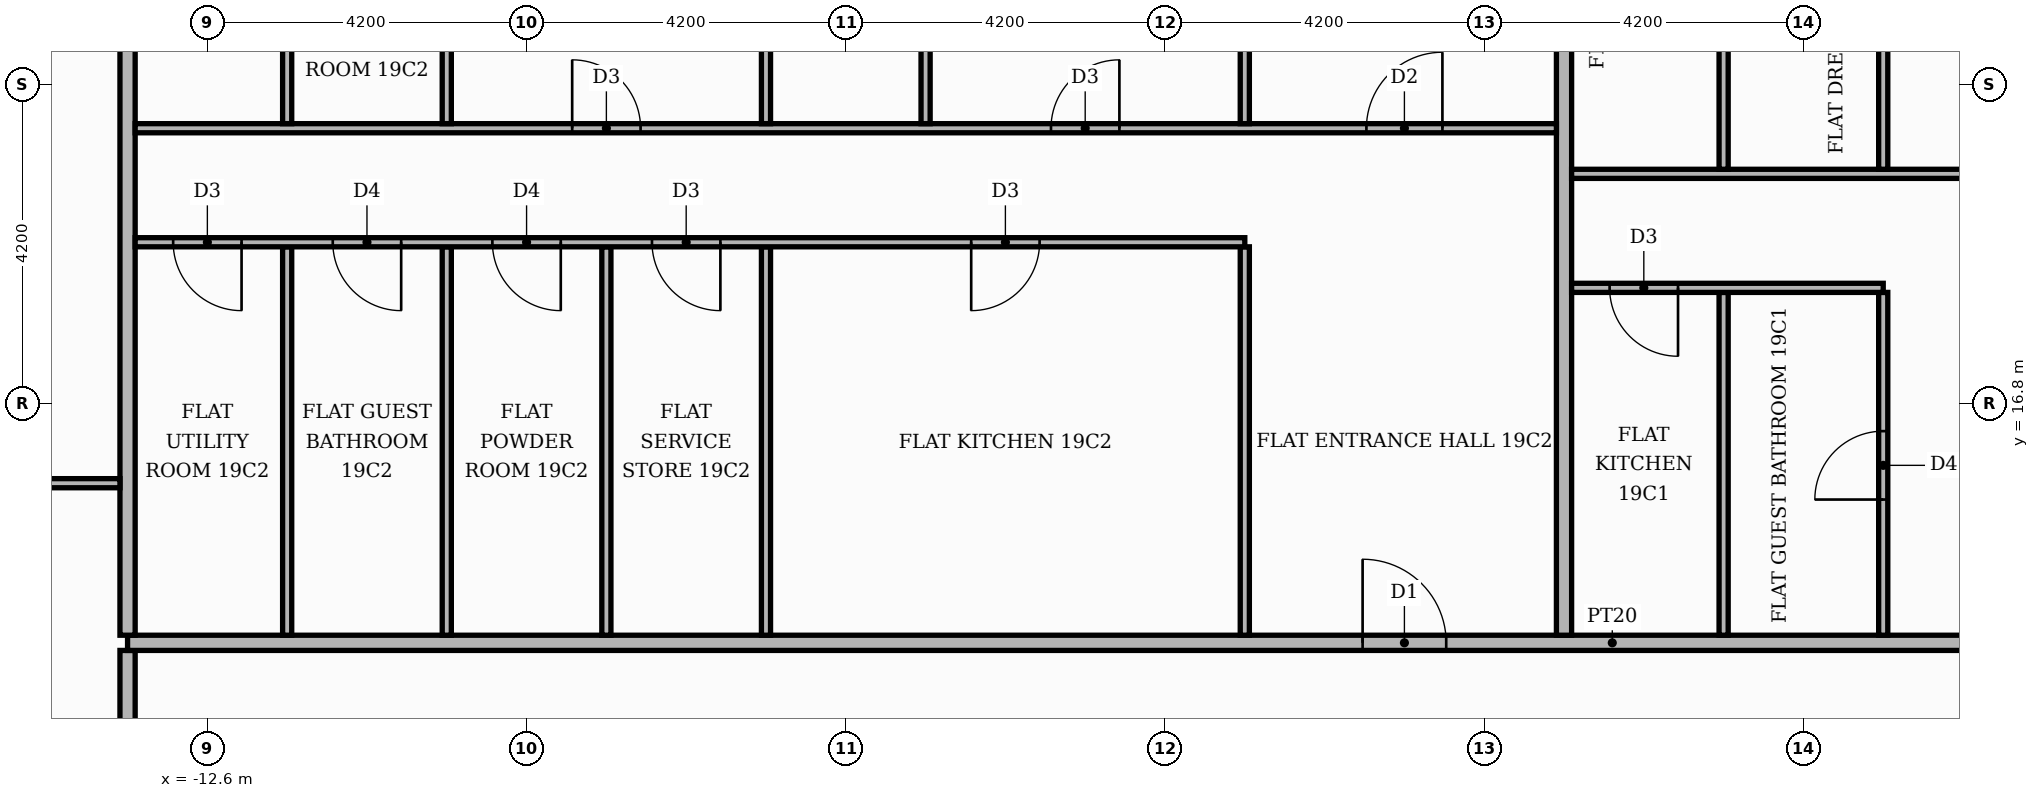
"""IFC4 building model, lengths in metres.
Left out: names, types, materials, properties, quantities, classifications, styles, units other than length and angle.
Written with IfcOpenShell. Run it as: python <this file> out.ifc"""

import sys

from ifc_helpers import new_model, si_unit, direction, frame, frame_2d, origin, place, context, subcontext, project, spatial, rectangle, extrude, element, fill, save


model = new_model("IFC4")
c1 = context("Model", 3, precision=1e-05, world=origin(), true_north=direction((0.0, 1.0)))
c2 = subcontext(c1, "Body", "Model", "MODEL_VIEW")
j1 = project(units=[si_unit("LENGTHUNIT", "METRE"), si_unit("PLANEANGLEUNIT", "RADIAN")], contexts=[c1])
p1 = place(None, origin())
s1 = spatial("IfcSite", under=j1, at=p1, CompositionType="ELEMENT")
p2 = place(p1, origin())
s2 = spatial("IfcBuilding", under=s1, at=p2, CompositionType="ELEMENT")
p3 = place(p2, frame((0.0, 0.0, 83.1)))
s3 = spatial("IfcBuildingStorey", under=s2, at=p3, CompositionType="ELEMENT", Elevation=83.1)
p4 = place(p3, frame((-13.65, 5.35, 0.0), z_axis=(0.0, 0.0, 1.0), x_axis=(0.0, 1.0, 0.0)))
e1 = element("IfcWall", 1, at=p4, inside=s3, PredefinedType="PARTITIONING", context=c2, shape_type="SweptSolid", body=[
    extrude(rectangle(XDim=8.2, YDim=0.2, at=frame_2d((4.1, 0.0))), origin(), (0.0, 0.0, 1.0), 3.48),
])
p5 = place(p4, frame((5.65, 0.0, 0.0)))
e2 = element("IfcOpeningElement", 2, at=p5, cuts=e1, PredefinedType="OPENING", context=c2, shape_type="SweptSolid", body=[
    extrude(rectangle(XDim=1.1, YDim=2.4, at=frame_2d((0.55, 1.2))), frame((0.0, 0.11, 0.0), z_axis=(0.0, -1.0, 0.0), x_axis=(1.0, 0.0, 0.0)), (0.0, 0.0, 1.0), 0.22),
])
p6 = place(p3, frame((-13.65, 13.65, 0.0), z_axis=(0.0, 0.0, 1.0), x_axis=(1.0, 0.0, 0.0)))
e3 = element("IfcWall", 3, at=p6, inside=s3, PredefinedType="PARTITIONING", context=c2, shape_type="SweptSolid", body=[
    extrude(rectangle(XDim=39.07, YDim=0.2, at=frame_2d((19.535, 0.0))), origin(), (0.0, 0.0, 1.0), 3.48),
])
p7 = place(p6, frame((24.65, 0.0, 0.0)))
e4 = element("IfcOpeningElement", 4, at=p7, cuts=e3, PredefinedType="OPENING", context=c2, shape_type="SweptSolid", body=[
    extrude(rectangle(XDim=1.1, YDim=2.4, at=frame_2d((0.55, 1.2))), frame((0.0, 0.11, 0.0), z_axis=(0.0, -1.0, 0.0), x_axis=(1.0, 0.0, 0.0)), (0.0, 0.0, 1.0), 0.22),
])
p8 = place(p6, frame((16.25, 0.0, 0.0)))
e5 = element("IfcOpeningElement", 5, at=p8, cuts=e3, PredefinedType="OPENING", context=c2, shape_type="SweptSolid", body=[
    extrude(rectangle(XDim=1.1, YDim=2.4, at=frame_2d((0.55, 1.2))), frame((0.0, 0.11, 0.0), z_axis=(0.0, -1.0, 0.0), x_axis=(1.0, 0.0, 0.0)), (0.0, 0.0, 1.0), 0.22),
])
p9 = place(p3, frame((-13.65, 13.75, 0.0), z_axis=(0.0, 0.0, 1.0), x_axis=(0.0, 1.0, 0.0)))
e6 = element("IfcWall", 6, at=p9, inside=s3, PredefinedType="PARTITIONING", context=c2, shape_type="SweptSolid", body=[
    extrude(rectangle(XDim=11.67, YDim=0.2, at=frame_2d((5.835, 0.0))), origin(), (0.0, 0.0, 1.0), 3.48),
])
for number, where, z_axis, x_axis in (
    (7, (-11.55, 13.75, 0.0), (0.0, 0.0, 1.0), (0.0, 1.0, 0.0)),
    (8, (-9.45, 13.75, 0.0), (0.0, 0.0, 1.0), (0.0, 1.0, 0.0)),
    (9, (-7.35, 13.75, 0.0), (0.0, 0.0, 1.0), (0.0, 1.0, 0.0)),
    (10, (-5.25, 13.75, 0.0), (0.0, 0.0, 1.0), (0.0, 1.0, 0.0)),
    (11, (1.05, 13.75, 0.0), (0.0, 0.0, 1.0), (0.0, 1.0, 0.0)),
):
    element("IfcWall", number, at=place(p3, frame(where, z_axis=z_axis, x_axis=x_axis)), inside=s3, PredefinedType="PARTITIONING", context=c2, shape_type="SweptSolid", body=[
        extrude(rectangle(XDim=5.11, YDim=0.12, at=frame_2d((2.555, 0.0))), origin(), (0.0, 0.0, 1.0), 3.48),
    ])
p10 = place(p3, frame((5.25, 13.75, 0.0), z_axis=(0.0, 0.0, 1.0), x_axis=(0.0, 1.0, 0.0)))
e12 = element("IfcWall", 12, at=p10, inside=s3, PredefinedType="PARTITIONING", context=c2, shape_type="SweptSolid", body=[
    extrude(rectangle(XDim=11.67, YDim=0.2, at=frame_2d((5.835, 0.0))), origin(), (0.0, 0.0, 1.0), 3.48),
])
p11 = place(p3, frame((7.35, 13.75, 0.0), z_axis=(0.0, 0.0, 1.0), x_axis=(0.0, 1.0, 0.0)))
e13 = element("IfcWall", 13, at=p11, inside=s3, PredefinedType="PARTITIONING", context=c2, shape_type="SweptSolid", body=[
    extrude(rectangle(XDim=4.51, YDim=0.12, at=frame_2d((2.255, 0.0))), origin(), (0.0, 0.0, 1.0), 3.48),
])
p12 = place(p3, frame((9.45, 13.75, 0.0), z_axis=(0.0, 0.0, 1.0), x_axis=(0.0, 1.0, 0.0)))
e14 = element("IfcWall", 14, at=p12, inside=s3, PredefinedType="PARTITIONING", context=c2, shape_type="SweptSolid", body=[
    extrude(rectangle(XDim=4.51, YDim=0.12, at=frame_2d((2.255, 0.0))), origin(), (0.0, 0.0, 1.0), 3.48),
])
p13 = place(p12, frame((1.785, 0.0, 0.0)))
e15 = element("IfcOpeningElement", 15, at=p13, cuts=e14, PredefinedType="OPENING", context=c2, shape_type="SweptSolid", body=[
    extrude(rectangle(XDim=0.9, YDim=2.1, at=frame_2d((0.45, 1.05))), frame((0.0, 0.07, 0.0), z_axis=(0.0, -1.0, 0.0), x_axis=(1.0, 0.0, 0.0)), (0.0, 0.0, 1.0), 0.14),
])
p14 = place(p3, frame((-19.82, 15.75, 0.0), z_axis=(0.0, 0.0, 1.0), x_axis=(1.0, 0.0, 0.0)))
e16 = element("IfcWall", 16, at=p14, inside=s3, PredefinedType="PARTITIONING", context=c2, shape_type="SweptSolid", body=[
    extrude(rectangle(XDim=6.07, YDim=0.12, at=frame_2d((3.035, 0.0))), origin(), (0.0, 0.0, 1.0), 3.48),
])
p15 = place(p14, frame((2.585, 0.0, 0.0)))
e17 = element("IfcOpeningElement", 17, at=p15, cuts=e16, PredefinedType="OPENING", context=c2, shape_type="SweptSolid", body=[
    extrude(rectangle(XDim=1.0, YDim=2.1, at=frame_2d((0.5, 1.05))), frame((0.0, 0.07, 0.0), z_axis=(0.0, -1.0, 0.0), x_axis=(1.0, 0.0, 0.0)), (0.0, 0.0, 1.0), 0.14),
])
p16 = place(p3, frame((5.35, 18.32, 0.0), z_axis=(0.0, 0.0, 1.0), x_axis=(1.0, 0.0, 0.0)))
e18 = element("IfcWall", 18, at=p16, inside=s3, PredefinedType="PARTITIONING", context=c2, shape_type="SweptSolid", body=[
    extrude(rectangle(XDim=4.1, YDim=0.12, at=frame_2d((2.05, 0.0))), origin(), (0.0, 0.0, 1.0), 3.48),
])
p17 = place(p16, frame((0.5, 0.0, 0.0)))
e19 = element("IfcOpeningElement", 19, at=p17, cuts=e18, PredefinedType="OPENING", context=c2, shape_type="SweptSolid", body=[
    extrude(rectangle(XDim=0.9, YDim=2.1, at=frame_2d((0.45, 1.05))), frame((0.0, 0.07, 0.0), z_axis=(0.0, -1.0, 0.0), x_axis=(1.0, 0.0, 0.0)), (0.0, 0.0, 1.0), 0.14),
])
p18 = place(p3, frame((-13.55, 18.92, 0.0), z_axis=(0.0, 0.0, 1.0), x_axis=(1.0, 0.0, 0.0)))
e20 = element("IfcWall", 20, at=p18, inside=s3, PredefinedType="PARTITIONING", context=c2, shape_type="SweptSolid", body=[
    extrude(rectangle(XDim=14.6, YDim=0.12, at=frame_2d((7.3, 0.0))), origin(), (0.0, 0.0, 1.0), 3.48),
])
p19 = place(p18, frame((11.0, 0.0, 0.0)))
e21 = element("IfcOpeningElement", 21, at=p19, cuts=e20, PredefinedType="OPENING", context=c2, shape_type="SweptSolid", body=[
    extrude(rectangle(XDim=0.9, YDim=2.1, at=frame_2d((0.45, 1.05))), frame((0.0, 0.07, 0.0), z_axis=(0.0, -1.0, 0.0), x_axis=(1.0, 0.0, 0.0)), (0.0, 0.0, 1.0), 0.14),
])
p20 = place(p18, frame((6.8, 0.0, 0.0)))
e22 = element("IfcOpeningElement", 22, at=p20, cuts=e20, PredefinedType="OPENING", context=c2, shape_type="SweptSolid", body=[
    extrude(rectangle(XDim=0.9, YDim=2.1, at=frame_2d((0.45, 1.05))), frame((0.0, 0.07, 0.0), z_axis=(0.0, -1.0, 0.0), x_axis=(1.0, 0.0, 0.0)), (0.0, 0.0, 1.0), 0.14),
])
p21 = place(p18, frame((4.7, 0.0, 0.0)))
e23 = element("IfcOpeningElement", 23, at=p21, cuts=e20, PredefinedType="OPENING", context=c2, shape_type="SweptSolid", body=[
    extrude(rectangle(XDim=0.9, YDim=2.1, at=frame_2d((0.45, 1.05))), frame((0.0, 0.07, 0.0), z_axis=(0.0, -1.0, 0.0), x_axis=(1.0, 0.0, 0.0)), (0.0, 0.0, 1.0), 0.14),
])
p22 = place(p18, frame((2.6, 0.0, 0.0)))
e24 = element("IfcOpeningElement", 24, at=p22, cuts=e20, PredefinedType="OPENING", context=c2, shape_type="SweptSolid", body=[
    extrude(rectangle(XDim=0.9, YDim=2.1, at=frame_2d((0.45, 1.05))), frame((0.0, 0.07, 0.0), z_axis=(0.0, -1.0, 0.0), x_axis=(1.0, 0.0, 0.0)), (0.0, 0.0, 1.0), 0.14),
])
p23 = place(p18, frame((0.5, 0.0, 0.0)))
e25 = element("IfcOpeningElement", 25, at=p23, cuts=e20, PredefinedType="OPENING", context=c2, shape_type="SweptSolid", body=[
    extrude(rectangle(XDim=0.9, YDim=2.1, at=frame_2d((0.45, 1.05))), frame((0.0, 0.07, 0.0), z_axis=(0.0, -1.0, 0.0), x_axis=(1.0, 0.0, 0.0)), (0.0, 0.0, 1.0), 0.14),
])
p24 = place(p3, frame((5.35, 19.82, 0.0), z_axis=(0.0, 0.0, 1.0), x_axis=(1.0, 0.0, 0.0)))
e26 = element("IfcWall", 26, at=p24, inside=s3, PredefinedType="PARTITIONING", context=c2, shape_type="SweptSolid", body=[
    extrude(rectangle(XDim=12.05, YDim=0.12, at=frame_2d((6.025, 0.0))), origin(), (0.0, 0.0, 1.0), 3.48),
])
p25 = place(p24, frame((8.85, 0.0, 0.0)))
e27 = element("IfcOpeningElement", 27, at=p25, cuts=e26, PredefinedType="OPENING", context=c2, shape_type="SweptSolid", body=[
    extrude(rectangle(XDim=1.0, YDim=2.1, at=frame_2d((0.5, 1.05))), frame((0.0, 0.07, 0.0), z_axis=(0.0, -1.0, 0.0), x_axis=(1.0, 0.0, 0.0)), (0.0, 0.0, 1.0), 0.14),
])
p26 = place(p24, frame((5.75, 0.0, 0.0)))
e28 = element("IfcOpeningElement", 28, at=p26, cuts=e26, PredefinedType="OPENING", context=c2, shape_type="SweptSolid", body=[
    extrude(rectangle(XDim=0.9, YDim=2.1, at=frame_2d((0.45, 1.05))), frame((0.0, 0.07, 0.0), z_axis=(0.0, -1.0, 0.0), x_axis=(1.0, 0.0, 0.0)), (0.0, 0.0, 1.0), 0.14),
])
p27 = place(p3, frame((7.35, 19.88, 0.0), z_axis=(0.0, 0.0, 1.0), x_axis=(0.0, 1.0, 0.0)))
e29 = element("IfcWall", 29, at=p27, inside=s3, PredefinedType="PARTITIONING", context=c2, shape_type="SweptSolid", body=[
    extrude(rectangle(XDim=5.54, YDim=0.12, at=frame_2d((2.77, 0.0))), origin(), (0.0, 0.0, 1.0), 3.48),
])
p28 = place(p27, frame((2.44, 0.0, 0.0)))
e30 = element("IfcOpeningElement", 30, at=p28, cuts=e29, PredefinedType="OPENING", context=c2, shape_type="SweptSolid", body=[
    extrude(rectangle(XDim=0.9, YDim=2.1, at=frame_2d((0.45, 1.05))), frame((0.0, 0.07, 0.0), z_axis=(0.0, -1.0, 0.0), x_axis=(1.0, 0.0, 0.0)), (0.0, 0.0, 1.0), 0.14),
])
p29 = place(p3, frame((9.45, 19.88, 0.0), z_axis=(0.0, 0.0, 1.0), x_axis=(0.0, 1.0, 0.0)))
e31 = element("IfcWall", 31, at=p29, inside=s3, PredefinedType="PARTITIONING", context=c2, shape_type="SweptSolid", body=[
    extrude(rectangle(XDim=5.54, YDim=0.12, at=frame_2d((2.77, 0.0))), origin(), (0.0, 0.0, 1.0), 3.48),
])
p30 = place(p29, frame((2.44, 0.0, 0.0)))
e32 = element("IfcOpeningElement", 32, at=p30, cuts=e31, PredefinedType="OPENING", context=c2, shape_type="SweptSolid", body=[
    extrude(rectangle(XDim=0.9, YDim=2.1, at=frame_2d((0.45, 1.05))), frame((0.0, 0.07, 0.0), z_axis=(0.0, -1.0, 0.0), x_axis=(1.0, 0.0, 0.0)), (0.0, 0.0, 1.0), 0.14),
])
p31 = place(p3, frame((-13.55, 20.42, 0.0), z_axis=(0.0, 0.0, 1.0), x_axis=(1.0, 0.0, 0.0)))
e33 = element("IfcWall", 33, at=p31, inside=s3, PredefinedType="PARTITIONING", context=c2, shape_type="SweptSolid", body=[
    extrude(rectangle(XDim=18.7, YDim=0.12, at=frame_2d((9.35, 0.0))), origin(), (0.0, 0.0, 1.0), 3.48),
])
p32 = place(p31, frame((16.2, 0.0, 0.0)))
e34 = element("IfcOpeningElement", 34, at=p32, cuts=e33, PredefinedType="OPENING", context=c2, shape_type="SweptSolid", body=[
    extrude(rectangle(XDim=1.0, YDim=2.1, at=frame_2d((0.5, 1.05))), frame((0.0, 0.07, 0.0), z_axis=(0.0, -1.0, 0.0), x_axis=(1.0, 0.0, 0.0)), (0.0, 0.0, 1.0), 0.14),
])
p33 = place(p31, frame((12.05, 0.0, 0.0)))
e35 = element("IfcOpeningElement", 35, at=p33, cuts=e33, PredefinedType="OPENING", context=c2, shape_type="SweptSolid", body=[
    extrude(rectangle(XDim=0.9, YDim=2.1, at=frame_2d((0.45, 1.05))), frame((0.0, 0.07, 0.0), z_axis=(0.0, -1.0, 0.0), x_axis=(1.0, 0.0, 0.0)), (0.0, 0.0, 1.0), 0.14),
])
p34 = place(p31, frame((5.75, 0.0, 0.0)))
e36 = element("IfcOpeningElement", 36, at=p34, cuts=e33, PredefinedType="OPENING", context=c2, shape_type="SweptSolid", body=[
    extrude(rectangle(XDim=0.9, YDim=2.1, at=frame_2d((0.45, 1.05))), frame((0.0, 0.07, 0.0), z_axis=(0.0, -1.0, 0.0), x_axis=(1.0, 0.0, 0.0)), (0.0, 0.0, 1.0), 0.14),
])
p35 = place(p3, frame((-11.55, 20.48, 0.0), z_axis=(0.0, 0.0, 1.0), x_axis=(0.0, 1.0, 0.0)))
e37 = element("IfcWall", 37, at=p35, inside=s3, PredefinedType="PARTITIONING", context=c2, shape_type="SweptSolid", body=[
    extrude(rectangle(XDim=4.94, YDim=0.12, at=frame_2d((2.47, 0.0))), origin(), (0.0, 0.0, 1.0), 3.48),
])
p36 = place(p35, frame((2.14, 0.0, 0.0)))
e38 = element("IfcOpeningElement", 38, at=p36, cuts=e37, PredefinedType="OPENING", context=c2, shape_type="SweptSolid", body=[
    extrude(rectangle(XDim=0.9, YDim=2.1, at=frame_2d((0.45, 1.05))), frame((0.0, 0.07, 0.0), z_axis=(0.0, -1.0, 0.0), x_axis=(1.0, 0.0, 0.0)), (0.0, 0.0, 1.0), 0.14),
])
p37 = place(p3, frame((-9.45, 20.48, 0.0), z_axis=(0.0, 0.0, 1.0), x_axis=(0.0, 1.0, 0.0)))
e39 = element("IfcWall", 39, at=p37, inside=s3, PredefinedType="PARTITIONING", context=c2, shape_type="SweptSolid", body=[
    extrude(rectangle(XDim=4.94, YDim=0.12, at=frame_2d((2.47, 0.0))), origin(), (0.0, 0.0, 1.0), 3.48),
])
p38 = place(p37, frame((2.14, 0.0, 0.0)))
e40 = element("IfcOpeningElement", 40, at=p38, cuts=e39, PredefinedType="OPENING", context=c2, shape_type="SweptSolid", body=[
    extrude(rectangle(XDim=0.9, YDim=2.1, at=frame_2d((0.45, 1.05))), frame((0.0, 0.07, 0.0), z_axis=(0.0, -1.0, 0.0), x_axis=(1.0, 0.0, 0.0)), (0.0, 0.0, 1.0), 0.14),
])
p39 = place(p3, frame((-5.25, 20.48, 0.0), z_axis=(0.0, 0.0, 1.0), x_axis=(0.0, 1.0, 0.0)))
e41 = element("IfcWall", 41, at=p39, inside=s3, PredefinedType="PARTITIONING", context=c2, shape_type="SweptSolid", body=[
    extrude(rectangle(XDim=4.94, YDim=0.12, at=frame_2d((2.47, 0.0))), origin(), (0.0, 0.0, 1.0), 3.48),
])
p40 = place(p3, frame((-3.15, 20.48, 0.0), z_axis=(0.0, 0.0, 1.0), x_axis=(0.0, 1.0, 0.0)))
e42 = element("IfcWall", 42, at=p40, inside=s3, PredefinedType="PARTITIONING", context=c2, shape_type="SweptSolid", body=[
    extrude(rectangle(XDim=4.94, YDim=0.12, at=frame_2d((2.47, 0.0))), origin(), (0.0, 0.0, 1.0), 3.48),
])
p41 = place(p40, frame((2.14, 0.0, 0.0)))
e43 = element("IfcOpeningElement", 43, at=p41, cuts=e42, PredefinedType="OPENING", context=c2, shape_type="SweptSolid", body=[
    extrude(rectangle(XDim=0.9, YDim=2.1, at=frame_2d((0.45, 1.05))), frame((0.0, 0.07, 0.0), z_axis=(0.0, -1.0, 0.0), x_axis=(1.0, 0.0, 0.0)), (0.0, 0.0, 1.0), 0.14),
])
p42 = place(p3, frame((1.05, 20.48, 0.0), z_axis=(0.0, 0.0, 1.0), x_axis=(0.0, 1.0, 0.0)))
e44 = element("IfcWall", 44, at=p42, inside=s3, PredefinedType="PARTITIONING", context=c2, shape_type="SweptSolid", body=[
    extrude(rectangle(XDim=4.94, YDim=0.12, at=frame_2d((2.47, 0.0))), origin(), (0.0, 0.0, 1.0), 3.48),
])
p43 = place(p13, origin())
e45 = element("IfcDoor", 45, at=p43, inside=s3, OperationType="SINGLE_SWING_LEFT", PredefinedType="DOOR", context=c2, shape_type="SweptSolid", body=[
    extrude(rectangle(XDim=0.9, YDim=2.1, at=frame_2d((0.45, 1.05))), frame((0.0, 0.025, 0.0), z_axis=(0.0, -1.0, 0.0), x_axis=(1.0, 0.0, 0.0)), (0.0, 0.0, 1.0), 0.05),
])
fill(e15, e45)
p44 = place(p17, frame((0.9, 0.0, 0.0), z_axis=(0.0, 0.0, 1.0), x_axis=(-1.0, 0.0, 0.0)))
e46 = element("IfcDoor", 46, at=p44, inside=s3, OperationType="SINGLE_SWING_RIGHT", PredefinedType="DOOR", context=c2, shape_type="SweptSolid", body=[
    extrude(rectangle(XDim=0.9, YDim=2.1, at=frame_2d((0.45, 1.05))), frame((0.0, 0.025, 0.0), z_axis=(0.0, -1.0, 0.0), x_axis=(1.0, 0.0, 0.0)), (0.0, 0.0, 1.0), 0.05),
])
fill(e19, e46)
p45 = place(p8, origin())
e47 = element("IfcDoor", 47, at=p45, inside=s3, OperationType="SINGLE_SWING_LEFT", PredefinedType="DOOR", context=c2, shape_type="SweptSolid", body=[
    extrude(rectangle(XDim=1.1, YDim=2.4, at=frame_2d((0.55, 1.2))), frame((0.0, 0.025, 0.0), z_axis=(0.0, -1.0, 0.0), x_axis=(1.0, 0.0, 0.0)), (0.0, 0.0, 1.0), 0.05),
])
fill(e5, e47)
p46 = place(p19, frame((0.9, 0.0, 0.0), z_axis=(0.0, 0.0, 1.0), x_axis=(-1.0, 0.0, 0.0)))
e48 = element("IfcDoor", 48, at=p46, inside=s3, OperationType="SINGLE_SWING_LEFT", PredefinedType="DOOR", context=c2, shape_type="SweptSolid", body=[
    extrude(rectangle(XDim=0.9, YDim=2.1, at=frame_2d((0.45, 1.05))), frame((0.0, 0.025, 0.0), z_axis=(0.0, -1.0, 0.0), x_axis=(1.0, 0.0, 0.0)), (0.0, 0.0, 1.0), 0.05),
])
fill(e21, e48)
p47 = place(p20, frame((0.9, 0.0, 0.0), z_axis=(0.0, 0.0, 1.0), x_axis=(-1.0, 0.0, 0.0)))
e49 = element("IfcDoor", 49, at=p47, inside=s3, OperationType="SINGLE_SWING_RIGHT", PredefinedType="DOOR", context=c2, shape_type="SweptSolid", body=[
    extrude(rectangle(XDim=0.9, YDim=2.1, at=frame_2d((0.45, 1.05))), frame((0.0, 0.025, 0.0), z_axis=(0.0, -1.0, 0.0), x_axis=(1.0, 0.0, 0.0)), (0.0, 0.0, 1.0), 0.05),
])
fill(e22, e49)
p48 = place(p21, frame((0.9, 0.0, 0.0), z_axis=(0.0, 0.0, 1.0), x_axis=(-1.0, 0.0, 0.0)))
e50 = element("IfcDoor", 50, at=p48, inside=s3, OperationType="SINGLE_SWING_RIGHT", PredefinedType="DOOR", context=c2, shape_type="SweptSolid", body=[
    extrude(rectangle(XDim=0.9, YDim=2.1, at=frame_2d((0.45, 1.05))), frame((0.0, 0.025, 0.0), z_axis=(0.0, -1.0, 0.0), x_axis=(1.0, 0.0, 0.0)), (0.0, 0.0, 1.0), 0.05),
])
fill(e23, e50)
p49 = place(p22, frame((0.9, 0.0, 0.0), z_axis=(0.0, 0.0, 1.0), x_axis=(-1.0, 0.0, 0.0)))
e51 = element("IfcDoor", 51, at=p49, inside=s3, OperationType="SINGLE_SWING_RIGHT", PredefinedType="DOOR", context=c2, shape_type="SweptSolid", body=[
    extrude(rectangle(XDim=0.9, YDim=2.1, at=frame_2d((0.45, 1.05))), frame((0.0, 0.025, 0.0), z_axis=(0.0, -1.0, 0.0), x_axis=(1.0, 0.0, 0.0)), (0.0, 0.0, 1.0), 0.05),
])
fill(e24, e51)
p50 = place(p23, frame((0.9, 0.0, 0.0), z_axis=(0.0, 0.0, 1.0), x_axis=(-1.0, 0.0, 0.0)))
e52 = element("IfcDoor", 52, at=p50, inside=s3, OperationType="SINGLE_SWING_RIGHT", PredefinedType="DOOR", context=c2, shape_type="SweptSolid", body=[
    extrude(rectangle(XDim=0.9, YDim=2.1, at=frame_2d((0.45, 1.05))), frame((0.0, 0.025, 0.0), z_axis=(0.0, -1.0, 0.0), x_axis=(1.0, 0.0, 0.0)), (0.0, 0.0, 1.0), 0.05),
])
fill(e25, e52)
p51 = place(p32, origin())
e53 = element("IfcDoor", 53, at=p51, inside=s3, OperationType="SINGLE_SWING_RIGHT", PredefinedType="DOOR", context=c2, shape_type="SweptSolid", body=[
    extrude(rectangle(XDim=1.0, YDim=2.1, at=frame_2d((0.5, 1.05))), frame((0.0, 0.025, 0.0), z_axis=(0.0, -1.0, 0.0), x_axis=(1.0, 0.0, 0.0)), (0.0, 0.0, 1.0), 0.05),
])
fill(e34, e53)
p52 = place(p33, origin())
e54 = element("IfcDoor", 54, at=p52, inside=s3, OperationType="SINGLE_SWING_RIGHT", PredefinedType="DOOR", context=c2, shape_type="SweptSolid", body=[
    extrude(rectangle(XDim=0.9, YDim=2.1, at=frame_2d((0.45, 1.05))), frame((0.0, 0.025, 0.0), z_axis=(0.0, -1.0, 0.0), x_axis=(1.0, 0.0, 0.0)), (0.0, 0.0, 1.0), 0.05),
])
fill(e35, e54)
p53 = place(p34, origin())
e55 = element("IfcDoor", 55, at=p53, inside=s3, OperationType="SINGLE_SWING_LEFT", PredefinedType="DOOR", context=c2, shape_type="SweptSolid", body=[
    extrude(rectangle(XDim=0.9, YDim=2.1, at=frame_2d((0.45, 1.05))), frame((0.0, 0.025, 0.0), z_axis=(0.0, -1.0, 0.0), x_axis=(1.0, 0.0, 0.0)), (0.0, 0.0, 1.0), 0.05),
])
fill(e36, e55)
save(model, sys.argv[1])
